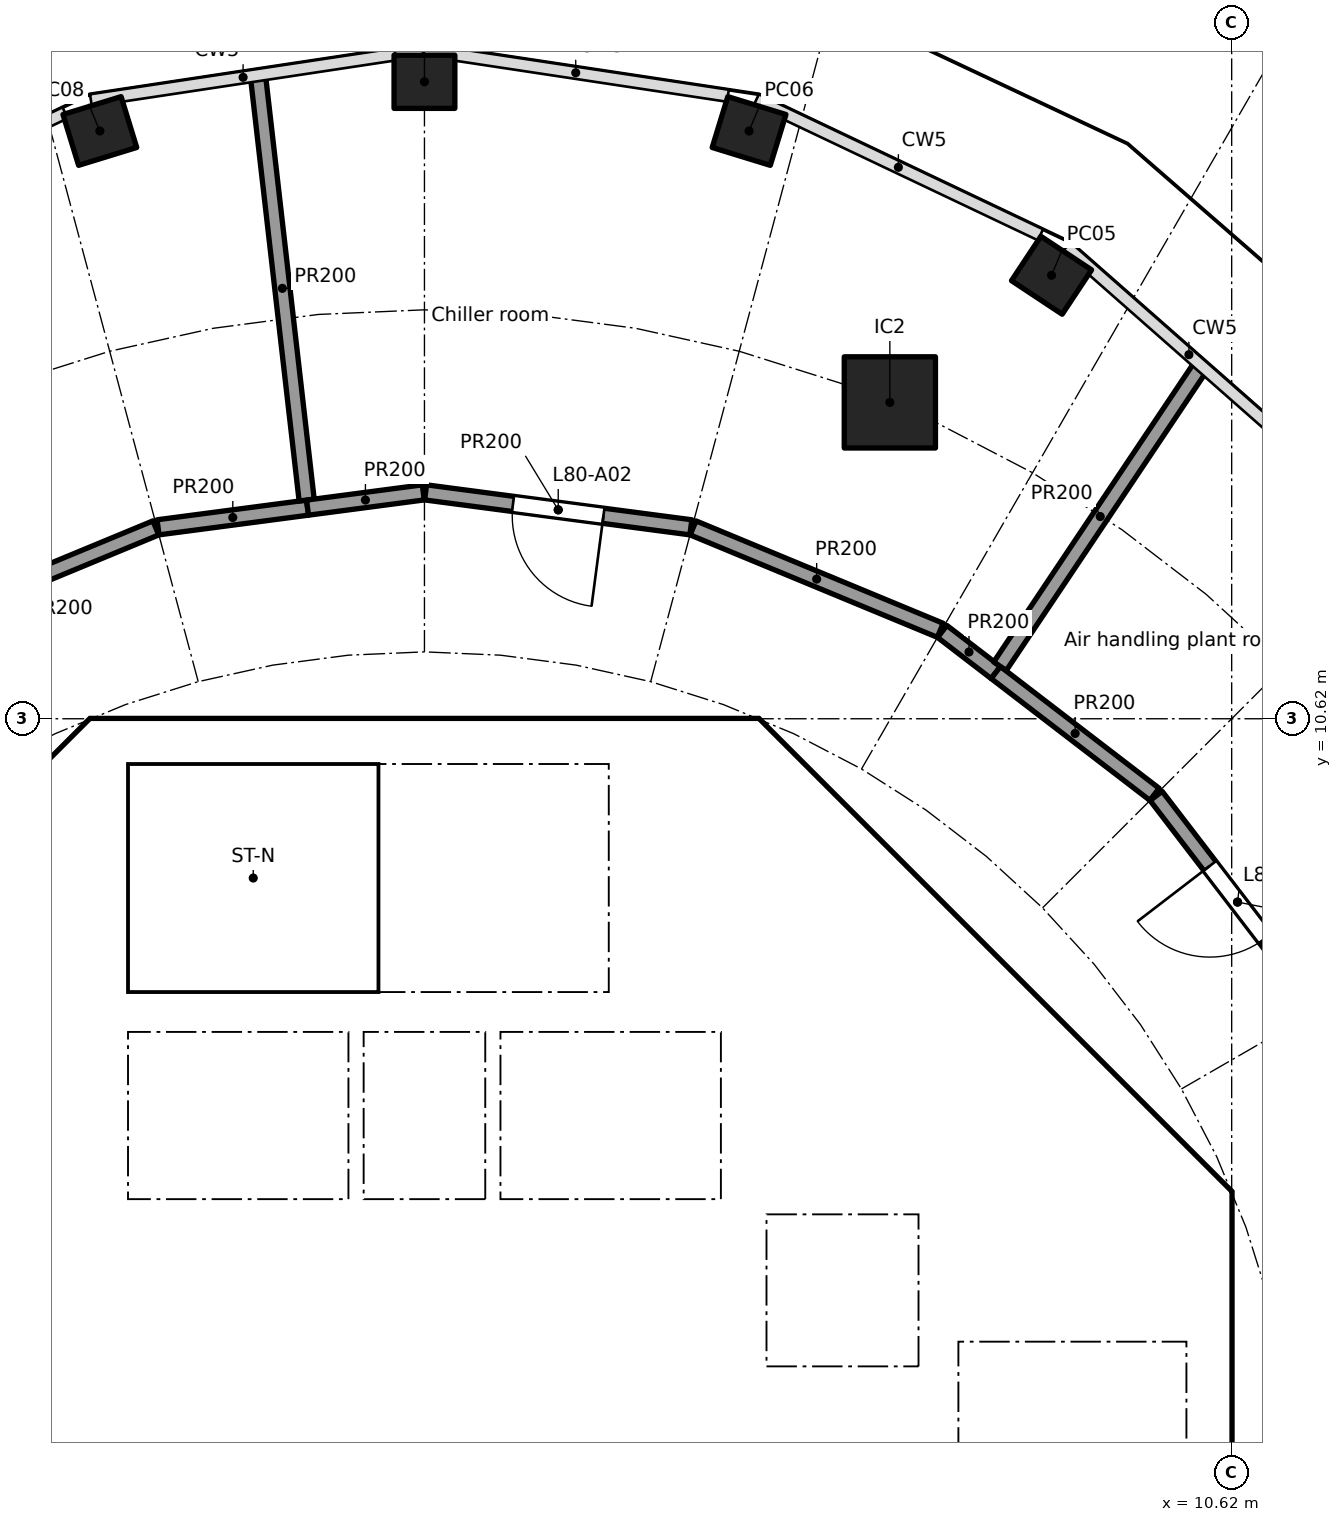
"""IFC4 building model, lengths in metres.
Left out: names, types, materials, properties, quantities, classifications, styles, units other than length and angle.
Written with IfcOpenShell. Run it as: python <this file> out.ifc"""

import sys

from ifc_helpers import new_model, si_unit, direction, frame, frame_2d, origin, origin_2d, place, context, subcontext, project, spatial, polyline, rectangle, hollow_rectangle, outline, extrude, element, fill, save


model = new_model("IFC4")
c1 = context("Model", 3, precision=1e-05, world=origin(), true_north=direction((0.0, 1.0)))
c2 = subcontext(c1, "Body", "Model", "MODEL_VIEW")
j1 = project(units=[si_unit("LENGTHUNIT", "METRE"), si_unit("PLANEANGLEUNIT", "RADIAN")], contexts=[c1])
p1 = place(None, origin())
s1 = spatial("IfcSite", under=j1, at=p1, CompositionType="ELEMENT")
p2 = place(p1, origin())
s2 = spatial("IfcBuilding", under=s1, at=p2, CompositionType="ELEMENT")
p3 = place(p2, frame((0.0, 0.0, 324.9)))
s3 = spatial("IfcBuildingStorey", under=s2, at=p3, CompositionType="ELEMENT", Elevation=324.9)
for number, where, z_axis, x_axis in (
    (1, (8.25, 16.455, 0.0), (0.0, 0.0, 1.0), (-0.834, 0.552, 0.0)),
    (2, (4.271, 18.353, 0.0), (0.0, 0.0, 1.0), (-0.956, 0.294, 0.0)),
    (3, (0.0, 19.0, 0.0), (0.0, 0.0, 1.0), (-1.0, 0.0, 0.0)),
    (4, (-4.271, 18.353, 0.0), (0.0, 0.0, 1.0), (-0.956, -0.294, 0.0)),
):
    element("IfcColumn", number, at=place(p3, frame(where, z_axis=z_axis, x_axis=x_axis)), inside=s3, PredefinedType="COLUMN", context=c2, shape_type="SweptSolid", body=[
        extrude(hollow_rectangle(XDim=0.8, YDim=0.7, WallThickness=0.025, at=origin_2d()), origin(), (0.0, 0.0, 1.0), 4.0),
    ])
p4 = place(p3, frame((6.123, 14.782, 0.0), z_axis=(0.0, 0.0, 1.0), x_axis=(1.0, 0.0, 0.0)))
e5 = element("IfcColumn", 5, at=p4, inside=s3, PredefinedType="COLUMN", context=c2, shape_type="SweptSolid", body=[
    extrude(rectangle(XDim=1.2, YDim=1.2, at=origin_2d()), origin(), (0.0, 0.0, 1.0), 4.0),
])
p5 = place(p3, frame((9.988, 4.613, 0.0), z_axis=(0.0, 0.0, 1.0), x_axis=(-0.707106781187, 0.707106781187, 0.0)))
e6 = element("IfcWall", 6, at=p5, inside=s3, PredefinedType="SHEAR", context=c2, shape_type="SweptSolid", body=[
    extrude(rectangle(XDim=7.602, YDim=0.6, at=frame_2d((3.801, 0.0))), origin(), (0.0, 0.0, 1.0), 3.7),
])
p6 = place(p5, frame((3.201, 0.0, 0.0)))
e7 = element("IfcOpeningElement", 7, at=p6, cuts=e6, PredefinedType="OPENING", context=c2, shape_type="SweptSolid", body=[
    extrude(rectangle(XDim=1.2, YDim=2.1, at=frame_2d((0.6, 1.05))), frame((0.0, 0.31, 0.0), z_axis=(0.0, -1.0, 0.0), x_axis=(1.0, 0.0, 0.0)), (0.0, 0.0, 1.0), 0.62),
])
p7 = place(p3, frame((-4.613, 9.988, 0.0), z_axis=(0.0, 0.0, 1.0), x_axis=(-0.707106781187, -0.707106781187, 0.0)))
e8 = element("IfcWall", 8, at=p7, inside=s3, PredefinedType="SHEAR", context=c2, shape_type="SweptSolid", body=[
    extrude(rectangle(XDim=7.602, YDim=0.6, at=frame_2d((3.801, 0.0))), origin(), (0.0, 0.0, 1.0), 3.7),
])
p8 = place(p7, frame((0.351, 0.0, 0.0)))
e9 = element("IfcOpeningElement", 9, at=p8, cuts=e8, PredefinedType="OPENING", context=c2, shape_type="SweptSolid", body=[
    extrude(rectangle(XDim=1.1, YDim=2.1, at=frame_2d((0.55, 1.05))), frame((0.0, 0.31, 0.0), z_axis=(0.0, -1.0, 0.0), x_axis=(1.0, 0.0, 0.0)), (0.0, 0.0, 1.0), 0.62),
])
p9 = place(p3, frame((4.0, 4.3, 0.0), z_axis=(0.0, 0.0, 1.0), x_axis=(0.0, 1.0, 0.0)))
e10 = element("IfcWall", 10, at=p9, inside=s3, PredefinedType="SOLIDWALL", context=c2, shape_type="SweptSolid", body=[
    extrude(rectangle(XDim=2.2, YDim=0.2, at=frame_2d((1.1, 0.0))), origin(), (0.0, 0.0, 1.0), 3.7),
])
p10 = place(p9, frame((0.55, 0.0, 0.0)))
e11 = element("IfcOpeningElement", 11, at=p10, cuts=e10, PredefinedType="OPENING", context=c2, shape_type="SweptSolid", body=[
    extrude(rectangle(XDim=1.1, YDim=2.1, at=frame_2d((0.55, 1.05))), frame((0.0, 0.11, 0.0), z_axis=(0.0, -1.0, 0.0), x_axis=(1.0, 0.0, 0.0)), (0.0, 0.0, 1.0), 0.22),
])
p11 = place(p3, frame((-4.0, 4.3, 0.0), z_axis=(0.0, 0.0, 1.0), x_axis=(0.0, 1.0, 0.0)))
e12 = element("IfcWall", 12, at=p11, inside=s3, PredefinedType="SOLIDWALL", context=c2, shape_type="SweptSolid", body=[
    extrude(rectangle(XDim=2.2, YDim=0.2, at=frame_2d((1.1, 0.0))), origin(), (0.0, 0.0, 1.0), 3.7),
])
p12 = place(p11, frame((0.55, 0.0, 0.0)))
e13 = element("IfcOpeningElement", 13, at=p12, cuts=e12, PredefinedType="OPENING", context=c2, shape_type="SweptSolid", body=[
    extrude(rectangle(XDim=1.1, YDim=2.1, at=frame_2d((0.55, 1.05))), frame((0.0, 0.11, 0.0), z_axis=(0.0, -1.0, 0.0), x_axis=(1.0, 0.0, 0.0)), (0.0, 0.0, 1.0), 0.22),
])
p13 = place(p3, frame((-6.7, 2.0, 0.0), z_axis=(0.0, 0.0, 1.0), x_axis=(1.0, 0.0, 0.0)))
e14 = element("IfcWall", 14, at=p13, inside=s3, PredefinedType="SOLIDWALL", context=c2, shape_type="SweptSolid", body=[
    extrude(rectangle(XDim=13.4, YDim=0.2, at=frame_2d((6.7, 0.0))), origin(), (0.0, 0.0, 1.0), 3.7),
])
p14 = place(p13, frame((1.85, 0.0, 0.0)))
e15 = element("IfcOpeningElement", 15, at=p14, cuts=e14, PredefinedType="OPENING", context=c2, shape_type="SweptSolid", body=[
    extrude(rectangle(XDim=0.9, YDim=2.1, at=frame_2d((0.45, 1.05))), frame((0.0, 0.11, 0.0), z_axis=(0.0, -1.0, 0.0), x_axis=(1.0, 0.0, 0.0)), (0.0, 0.0, 1.0), 0.22),
])
p15 = place(p13, frame((5.15, 0.0, 0.0)))
e16 = element("IfcOpeningElement", 16, at=p15, cuts=e14, PredefinedType="OPENING", context=c2, shape_type="SweptSolid", body=[
    extrude(rectangle(XDim=0.9, YDim=2.1, at=frame_2d((0.45, 1.05))), frame((0.0, 0.11, 0.0), z_axis=(0.0, -1.0, 0.0), x_axis=(1.0, 0.0, 0.0)), (0.0, 0.0, 1.0), 0.22),
])
p16 = place(p13, frame((8.45, 0.0, 0.0)))
e17 = element("IfcOpeningElement", 17, at=p16, cuts=e14, PredefinedType="OPENING", context=c2, shape_type="SweptSolid", body=[
    extrude(rectangle(XDim=0.9, YDim=2.1, at=frame_2d((0.45, 1.05))), frame((0.0, 0.11, 0.0), z_axis=(0.0, -1.0, 0.0), x_axis=(1.0, 0.0, 0.0)), (0.0, 0.0, 1.0), 0.22),
])
p17 = place(p3, frame((6.7, 4.0, 0.0), z_axis=(0.0, 0.0, 1.0), x_axis=(1.0, 0.0, 0.0)))
e18 = element("IfcWall", 18, at=p17, inside=s3, PredefinedType="SOLIDWALL", context=c2, shape_type="SweptSolid", body=[
    extrude(rectangle(XDim=3.325, YDim=0.2, at=frame_2d((1.662, 0.0))), origin(), (0.0, 0.0, 1.0), 3.7),
])
p18 = place(p17, frame((1.25, 0.0, 0.0)))
e19 = element("IfcOpeningElement", 19, at=p18, cuts=e18, PredefinedType="OPENING", context=c2, shape_type="SweptSolid", body=[
    extrude(rectangle(XDim=1.1, YDim=2.1, at=frame_2d((0.55, 1.05))), frame((0.0, 0.11, 0.0), z_axis=(0.0, -1.0, 0.0), x_axis=(1.0, 0.0, 0.0)), (0.0, 0.0, 1.0), 0.22),
])
p19 = place(p3, frame((4.0, 7.025, 0.0), z_axis=(0.0, 0.0, 1.0), x_axis=(0.0, 1.0, 0.0)))
e20 = element("IfcWall", 20, at=p19, inside=s3, PredefinedType="SOLIDWALL", context=c2, shape_type="SweptSolid", body=[
    extrude(rectangle(XDim=3.0, YDim=0.2, at=frame_2d((1.5, 0.0))), origin(), (0.0, 0.0, 1.0), 3.7),
])
p20 = place(p19, frame((0.925, 0.0, 0.0)))
e21 = element("IfcOpeningElement", 21, at=p20, cuts=e20, PredefinedType="OPENING", context=c2, shape_type="SweptSolid", body=[
    extrude(rectangle(XDim=1.1, YDim=2.1, at=frame_2d((0.55, 1.05))), frame((0.0, 0.11, 0.0), z_axis=(0.0, -1.0, 0.0), x_axis=(1.0, 0.0, 0.0)), (0.0, 0.0, 1.0), 0.22),
])
p21 = place(p3, origin())
e22 = element("IfcWall", 22, at=p21, inside=s3, PredefinedType="SHEAR", context=c2, shape_type="SweptSolid", body=[
    extrude(outline(polyline([(-4.152, 10.025), (-4.401, 9.776), (-4.825, 10.2), (-4.401, 10.625), (4.401, 10.625), (4.825, 10.2), (4.401, 9.776), (4.152, 10.025), (-4.152, 10.025)])), origin(), (0.0, 0.0, 1.0), 3.7),
])
p22 = place(p3, origin())
e23 = element("IfcWall", 23, at=p22, inside=s3, PredefinedType="SHEAR", context=c2, shape_type="SweptSolid", body=[
    extrude(outline(polyline([(9.776, -4.401), (10.025, -4.152), (10.025, -3.801), (10.025, 4.152), (9.776, 4.401), (10.2, 4.825), (10.625, 4.401), (10.625, -4.401), (10.2, -4.825), (9.776, -4.401)])), origin(), (0.0, 0.0, 1.0), 3.7),
])
for number, where, z_axis, x_axis in (
    (24, (-0.9, 4.3, 0.0), (0.0, 0.0, 1.0), (0.0, 1.0, 0.0)),
    (25, (0.9, 4.3, 0.0), (0.0, 0.0, 1.0), (0.0, 1.0, 0.0)),
):
    element("IfcWall", number, at=place(p3, frame(where, z_axis=z_axis, x_axis=x_axis)), inside=s3, PredefinedType="SOLIDWALL", context=c2, shape_type="SweptSolid", body=[
        extrude(rectangle(XDim=2.2, YDim=0.2, at=frame_2d((1.1, 0.0))), origin(), (0.0, 0.0, 1.0), 3.7),
    ])
p23 = place(p3, origin())
e26 = element("IfcWall", 26, at=p23, inside=s3, PredefinedType="SOLIDWALL", context=c2, shape_type="SweptSolid", body=[
    extrude(outline(polyline([(-6.7, 4.3), (6.7, 4.3), (6.7, 2.1), (6.5, 2.1), (6.5, 4.1), (4.5, 4.1), (4.5, 2.1), (4.3, 2.1), (4.3, 4.1), (0.1, 4.1), (0.1, 2.1), (-0.1, 2.1), (-0.1, 4.1), (-2.1, 4.1), (-2.1, 2.1), (-2.3, 2.1), (-2.3, 4.1), (-6.5, 4.1), (-6.5, 2.1), (-6.7, 2.1), (-6.7, 4.3)])), origin(), (0.0, 0.0, 1.0), 3.7),
])
p24 = place(p3, origin())
e27 = element("IfcWall", 27, at=p24, inside=s3, PredefinedType="SOLIDWALL", context=c2, shape_type="SweptSolid", body=[
    extrude(outline(polyline([(-3.9, 7.025), (-4.1, 7.025), (-4.1, 10.025), (-3.9, 10.025), (-3.9, 7.025)])), origin(), (0.0, 0.0, 1.0), 3.7),
])
p25 = place(p3, origin())
e28 = element("IfcWall", 28, at=p25, inside=s3, PredefinedType="SOLIDWALL", context=c2, shape_type="SweptSolid", body=[
    extrude(outline(polyline([(4.1, 6.5), (-4.1, 6.5), (-4.1, 7.025), (4.1, 7.025), (4.1, 6.5)])), origin(), (0.0, 0.0, 1.0), 3.7),
])
p26 = place(p3, origin())
e29 = element("IfcWall", 29, at=p26, inside=s3, PredefinedType="SOLIDWALL", context=c2, shape_type="SweptSolid", body=[
    extrude(outline(polyline([(7.025, -3.9), (6.7, -3.9), (6.7, 3.9), (7.025, 3.9), (7.025, -3.9)])), origin(), (0.0, 0.0, 1.0), 3.7),
])
p27 = place(p3, frame((-6.786, 11.784, 0.0), z_axis=(0.0, 0.0, 1.0), x_axis=(0.92386297064, 0.382723413813, 0.0)))
e30 = element("IfcWall", 30, at=p27, inside=s3, PredefinedType="PARTITIONING", context=c2, shape_type="SweptSolid", body=[
    extrude(rectangle(XDim=3.52, YDim=0.2, at=frame_2d((1.76, 0.0))), origin(), (0.0, 0.0, 1.0), 3.7),
])
p28 = place(p27, frame((0.342, 0.0, 0.0)))
e31 = element("IfcOpeningElement", 31, at=p28, cuts=e30, PredefinedType="OPENING", context=c2, shape_type="SweptSolid", body=[
    extrude(rectangle(XDim=0.9, YDim=2.1, at=frame_2d((0.45, 1.05))), frame((0.0, 0.11, 0.0), z_axis=(0.0, -1.0, 0.0), x_axis=(1.0, 0.0, 0.0)), (0.0, 0.0, 1.0), 0.22),
])
p29 = place(p3, frame((-3.505, 13.139, 0.0), z_axis=(0.0, 0.0, 1.0), x_axis=(0.991454295543, 0.130454512571, 0.0)))
e32 = element("IfcWall", 32, at=p29, inside=s3, PredefinedType="PARTITIONING", context=c2, shape_type="SweptSolid", body=[
    extrude(rectangle(XDim=1.984, YDim=0.2, at=frame_2d((0.992, 0.0))), origin(), (0.0, 0.0, 1.0), 3.7),
])
p30 = place(p3, frame((-1.55, 13.497, 0.0), z_axis=(0.0, 0.0, 1.0), x_axis=(-0.114057329834, 0.993474169524, 0.0)))
e33 = element("IfcWall", 33, at=p30, inside=s3, PredefinedType="PARTITIONING", context=c2, shape_type="SweptSolid", body=[
    extrude(rectangle(XDim=5.608, YDim=0.2, at=frame_2d((2.804, 0.0))), origin(), (0.0, 0.0, 1.0), 3.7),
])
p31 = place(p3, frame((-1.538, 13.397, 0.0), z_axis=(0.0, 0.0, 1.0), x_axis=(0.991449967232, 0.13048740351, 0.0)))
e34 = element("IfcWall", 34, at=p31, inside=s3, PredefinedType="PARTITIONING", context=c2, shape_type="SweptSolid", body=[
    extrude(rectangle(XDim=1.536, YDim=0.2, at=frame_2d((0.768, 0.0))), origin(), (0.0, 0.0, 1.0), 3.7),
])
p32 = place(p3, frame((0.015, 13.598, 0.0), z_axis=(0.0, 0.0, 1.0), x_axis=(0.991452406768, -0.130468866457, 0.0)))
e35 = element("IfcWall", 35, at=p32, inside=s3, PredefinedType="PARTITIONING", context=c2, shape_type="SweptSolid", body=[
    extrude(rectangle(XDim=3.52, YDim=0.2, at=frame_2d((1.76, 0.0))), origin(), (0.0, 0.0, 1.0), 3.7),
])
p33 = place(p32, frame((1.16, 0.0, 0.0)))
e36 = element("IfcOpeningElement", 36, at=p33, cuts=e35, PredefinedType="OPENING", context=c2, shape_type="SweptSolid", body=[
    extrude(rectangle(XDim=1.2, YDim=2.1, at=frame_2d((0.6, 1.05))), frame((0.0, 0.11, 0.0), z_axis=(0.0, -1.0, 0.0), x_axis=(1.0, 0.0, 0.0)), (0.0, 0.0, 1.0), 0.22),
])
p34 = place(p3, frame((3.534, 13.131, 0.0), z_axis=(0.0, 0.0, 1.0), x_axis=(0.92386297064, -0.382723413813, 0.0)))
e37 = element("IfcWall", 37, at=p34, inside=s3, PredefinedType="PARTITIONING", context=c2, shape_type="SweptSolid", body=[
    extrude(rectangle(XDim=3.52, YDim=0.2, at=frame_2d((1.76, 0.0))), origin(), (0.0, 0.0, 1.0), 3.7),
])
p35 = place(p3, frame((6.812, 11.769, 0.0), z_axis=(0.0, 0.0, 1.0), x_axis=(0.793420478802, -0.608673922407, 0.0)))
e38 = element("IfcWall", 38, at=p35, inside=s3, PredefinedType="PARTITIONING", context=c2, shape_type="SweptSolid", body=[
    extrude(rectangle(XDim=0.888, YDim=0.2, at=frame_2d((0.444, 0.0))), origin(), (0.0, 0.0, 1.0), 3.7),
])
p36 = place(p3, frame((7.517, 11.228, 0.0), z_axis=(0.0, 0.0, 1.0), x_axis=(0.793395797287, -0.608706093979, 0.0)))
e39 = element("IfcWall", 39, at=p36, inside=s3, PredefinedType="PARTITIONING", context=c2, shape_type="SweptSolid", body=[
    extrude(rectangle(XDim=2.632, YDim=0.2, at=frame_2d((1.316, 0.0))), origin(), (0.0, 0.0, 1.0), 3.7),
])
p37 = place(p3, frame((7.572, 11.311, 0.0), z_axis=(0.0, 0.0, 1.0), x_axis=(0.55629198168, 0.830986901893, 0.0)))
e40 = element("IfcWall", 40, at=p37, inside=s3, PredefinedType="PARTITIONING", context=c2, shape_type="SweptSolid", body=[
    extrude(rectangle(XDim=4.74, YDim=0.2, at=frame_2d((2.37, 0.0))), origin(), (0.0, 0.0, 1.0), 3.7),
])
p38 = place(p3, frame((9.626, 9.605, 0.0), z_axis=(0.0, 0.0, 1.0), x_axis=(0.608697977542, -0.793402024283, 0.0)))
e41 = element("IfcWall", 41, at=p38, inside=s3, PredefinedType="PARTITIONING", context=c2, shape_type="SweptSolid", body=[
    extrude(rectangle(XDim=3.52, YDim=0.2, at=frame_2d((1.76, 0.0))), origin(), (0.0, 0.0, 1.0), 3.7),
])
p39 = place(p38, frame((1.16, 0.0, 0.0)))
e42 = element("IfcOpeningElement", 42, at=p39, cuts=e41, PredefinedType="OPENING", context=c2, shape_type="SweptSolid", body=[
    extrude(rectangle(XDim=1.2, YDim=2.1, at=frame_2d((0.6, 1.05))), frame((0.0, 0.11, 0.0), z_axis=(0.0, -1.0, 0.0), x_axis=(1.0, 0.0, 0.0)), (0.0, 0.0, 1.0), 0.22),
])
p40 = place(p10, origin())
e43 = element("IfcDoor", 43, at=p40, inside=s3, OperationType="DOUBLE_DOOR_SLIDING", PredefinedType="DOOR", context=c2, shape_type="SweptSolid", body=[
    extrude(rectangle(XDim=1.1, YDim=2.1, at=frame_2d((0.55, 1.05))), frame((0.0, 0.025, 0.0), z_axis=(0.0, -1.0, 0.0), x_axis=(1.0, 0.0, 0.0)), (0.0, 0.0, 1.0), 0.05),
])
fill(e11, e43)
p41 = place(p12, origin())
e44 = element("IfcDoor", 44, at=p41, inside=s3, OperationType="DOUBLE_DOOR_SLIDING", PredefinedType="DOOR", context=c2, shape_type="SweptSolid", body=[
    extrude(rectangle(XDim=1.1, YDim=2.1, at=frame_2d((0.55, 1.05))), frame((0.0, 0.025, 0.0), z_axis=(0.0, -1.0, 0.0), x_axis=(1.0, 0.0, 0.0)), (0.0, 0.0, 1.0), 0.05),
])
fill(e13, e44)
p42 = place(p18, frame((1.1, 0.0, 0.0), x_axis=(-1.0, 0.0, 0.0)))
e45 = element("IfcDoor", 45, at=p42, inside=s3, OperationType="SINGLE_SWING_LEFT", PredefinedType="DOOR", context=c2, shape_type="SweptSolid", body=[
    extrude(rectangle(XDim=1.1, YDim=2.1, at=frame_2d((0.55, 1.05))), frame((0.0, 0.025, 0.0), z_axis=(0.0, -1.0, 0.0), x_axis=(1.0, 0.0, 0.0)), (0.0, 0.0, 1.0), 0.05),
])
fill(e19, e45)
p43 = place(p20, origin())
e46 = element("IfcDoor", 46, at=p43, inside=s3, OperationType="SINGLE_SWING_RIGHT", PredefinedType="DOOR", context=c2, shape_type="SweptSolid", body=[
    extrude(rectangle(XDim=1.1, YDim=2.1, at=frame_2d((0.55, 1.05))), frame((0.0, 0.025, 0.0), z_axis=(0.0, -1.0, 0.0), x_axis=(1.0, 0.0, 0.0)), (0.0, 0.0, 1.0), 0.05),
])
fill(e21, e46)
p44 = place(p14, origin())
e47 = element("IfcDoor", 47, at=p44, inside=s3, OperationType="SINGLE_SWING_RIGHT", PredefinedType="DOOR", context=c2, shape_type="SweptSolid", body=[
    extrude(rectangle(XDim=0.9, YDim=2.1, at=frame_2d((0.45, 1.05))), frame((0.0, 0.025, 0.0), z_axis=(0.0, -1.0, 0.0), x_axis=(1.0, 0.0, 0.0)), (0.0, 0.0, 1.0), 0.05),
])
fill(e15, e47)
p45 = place(p15, origin())
e48 = element("IfcDoor", 48, at=p45, inside=s3, OperationType="SINGLE_SWING_RIGHT", PredefinedType="DOOR", context=c2, shape_type="SweptSolid", body=[
    extrude(rectangle(XDim=0.9, YDim=2.1, at=frame_2d((0.45, 1.05))), frame((0.0, 0.025, 0.0), z_axis=(0.0, -1.0, 0.0), x_axis=(1.0, 0.0, 0.0)), (0.0, 0.0, 1.0), 0.05),
])
fill(e16, e48)
p46 = place(p16, origin())
e49 = element("IfcDoor", 49, at=p46, inside=s3, OperationType="SINGLE_SWING_RIGHT", PredefinedType="DOOR", context=c2, shape_type="SweptSolid", body=[
    extrude(rectangle(XDim=0.9, YDim=2.1, at=frame_2d((0.45, 1.05))), frame((0.0, 0.025, 0.0), z_axis=(0.0, -1.0, 0.0), x_axis=(1.0, 0.0, 0.0)), (0.0, 0.0, 1.0), 0.05),
])
fill(e17, e49)
p47 = place(p6, origin())
e50 = element("IfcDoor", 50, at=p47, inside=s3, OperationType="SINGLE_SWING_LEFT", PredefinedType="DOOR", context=c2, shape_type="SweptSolid", body=[
    extrude(rectangle(XDim=1.2, YDim=2.1, at=frame_2d((0.6, 1.05))), frame((0.0, 0.025, 0.0), z_axis=(0.0, -1.0, 0.0), x_axis=(1.0, 0.0, 0.0)), (0.0, 0.0, 1.0), 0.05),
])
fill(e7, e50)
p48 = place(p8, origin())
e51 = element("IfcDoor", 51, at=p48, inside=s3, OperationType="SINGLE_SWING_LEFT", PredefinedType="DOOR", context=c2, shape_type="SweptSolid", body=[
    extrude(rectangle(XDim=1.1, YDim=2.1, at=frame_2d((0.55, 1.05))), frame((0.0, 0.025, 0.0), z_axis=(0.0, -1.0, 0.0), x_axis=(1.0, 0.0, 0.0)), (0.0, 0.0, 1.0), 0.05),
])
fill(e9, e51)
p49 = place(p39, frame((1.2, 0.0, 0.0), x_axis=(-1.0, 0.0, 0.0)))
e52 = element("IfcDoor", 52, at=p49, inside=s3, OperationType="SINGLE_SWING_RIGHT", PredefinedType="DOOR", context=c2, shape_type="SweptSolid", body=[
    extrude(rectangle(XDim=1.2, YDim=2.1, at=frame_2d((0.6, 1.05))), frame((0.0, 0.025, 0.0), z_axis=(0.0, -1.0, 0.0), x_axis=(1.0, 0.0, 0.0)), (0.0, 0.0, 1.0), 0.05),
])
fill(e42, e52)
p50 = place(p33, frame((1.2, 0.0, 0.0), x_axis=(-1.0, 0.0, 0.0)))
e53 = element("IfcDoor", 53, at=p50, inside=s3, OperationType="SINGLE_SWING_LEFT", PredefinedType="DOOR", context=c2, shape_type="SweptSolid", body=[
    extrude(rectangle(XDim=1.2, YDim=2.1, at=frame_2d((0.6, 1.05))), frame((0.0, 0.025, 0.0), z_axis=(0.0, -1.0, 0.0), x_axis=(1.0, 0.0, 0.0)), (0.0, 0.0, 1.0), 0.05),
])
fill(e36, e53)
save(model, sys.argv[1])
